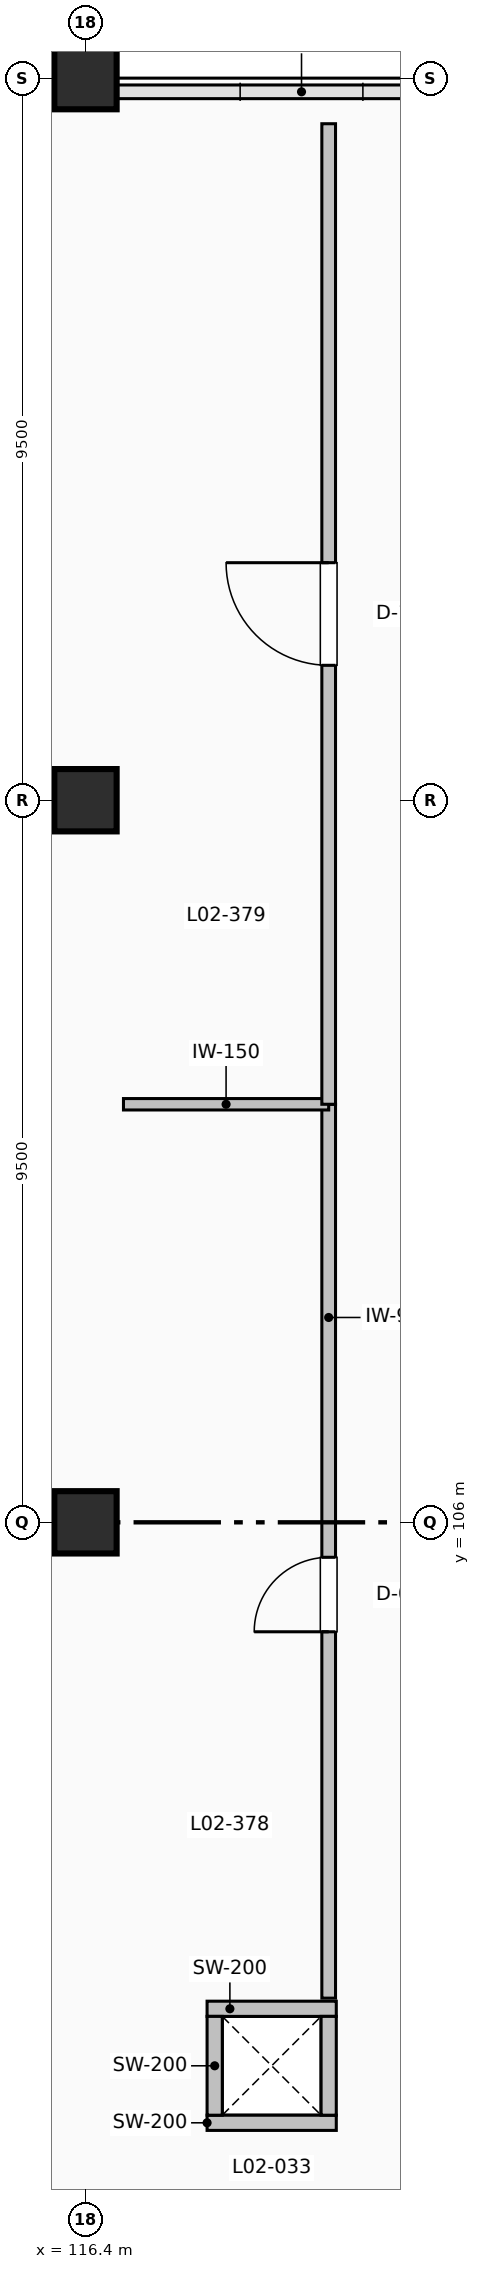
"""IFC4 building model, lengths in metres.
Left out: names, types, materials, properties, quantities, classifications, styles, units other than length and angle.
Written with IfcOpenShell. Run it as: python <this file> out.ifc"""

import sys

from ifc_helpers import new_model, si_unit, direction, frame, frame_2d, origin, origin_2d, place, context, subcontext, project, spatial, rectangle, extrude, element, fill, save


model = new_model("IFC4")
c1 = context("Model", 3, precision=1e-05, world=origin(), true_north=direction((0.0, 1.0)))
c2 = subcontext(c1, "Body", "Model", "MODEL_VIEW")
j1 = project(units=[si_unit("LENGTHUNIT", "METRE"), si_unit("PLANEANGLEUNIT", "RADIAN")], contexts=[c1])
p1 = place(None, origin())
s1 = spatial("IfcSite", under=j1, at=p1, CompositionType="ELEMENT")
p2 = place(p1, origin())
s2 = spatial("IfcBuilding", under=s1, at=p2, CompositionType="ELEMENT")
p3 = place(p2, frame((0.0, 0.0, 10.2)))
s3 = spatial("IfcBuildingStorey", under=s2, at=p3, CompositionType="ELEMENT", Elevation=10.2)
for number, where, z_axis, x_axis in (
    (1, (116.4, 106.0, 0.0), (0.0, 0.0, 1.0), (1.0, 0.0, 0.0)),
    (2, (116.4, 115.5, 0.0), (0.0, 0.0, 1.0), (1.0, 0.0, 0.0)),
    (3, (116.4, 125.0, 0.0), (0.0, 0.0, 1.0), (1.0, 0.0, 0.0)),
):
    element("IfcColumn", number, at=place(p3, frame(where, z_axis=z_axis, x_axis=x_axis)), inside=s3, PredefinedType="COLUMN", context=c2, shape_type="SweptSolid", body=[
        extrude(rectangle(XDim=0.82, YDim=0.82, at=origin_2d()), origin(), (0.0, 0.0, 1.0), 4.8),
    ])
for number, where, z_axis, x_axis in (
    (4, (118.0, 98.1, 0.0), (0.0, 0.0, 1.0), (1.0, 0.0, 0.0)),
    (5, (119.7, 99.6, 0.0), (0.0, 0.0, 1.0), (-1.0, 0.0, 0.0)),
):
    element("IfcWall", number, at=place(p3, frame(where, z_axis=z_axis, x_axis=x_axis)), inside=s3, PredefinedType="PARTITIONING", context=c2, shape_type="SweptSolid", body=[
        extrude(rectangle(XDim=1.7, YDim=0.2, at=frame_2d((0.85, 0.0))), origin(), (0.0, 0.0, 1.0), 4.5),
    ])
for number, where, z_axis, x_axis in (
    (6, (118.1, 98.2, 0.0), (0.0, 0.0, 1.0), (0.0, 1.0, 0.0)),
    (7, (119.6, 99.5, 0.0), (0.0, 0.0, 1.0), (0.0, -1.0, 0.0)),
):
    element("IfcWall", number, at=place(p3, frame(where, z_axis=z_axis, x_axis=x_axis)), inside=s3, PredefinedType="PARTITIONING", context=c2, shape_type="SweptSolid", body=[
        extrude(rectangle(XDim=1.3, YDim=0.2, at=frame_2d((0.65, 0.0))), origin(), (0.0, 0.0, 1.0), 4.5),
    ])
p4 = place(p3, frame((119.6, 99.74, 0.0), z_axis=(0.0, 0.0, 1.0), x_axis=(0.0, 1.0, 0.0)))
e8 = element("IfcWall", 8, at=p4, inside=s3, PredefinedType="PARTITIONING", context=c2, shape_type="SweptSolid", body=[
    extrude(rectangle(XDim=11.76, YDim=0.18, at=frame_2d((5.88, 0.0))), origin(), (0.0, 0.0, 1.0), 4.492),
])
p5 = place(p4, frame((4.82, 0.0, 0.0)))
e9 = element("IfcOpeningElement", 9, at=p5, cuts=e8, PredefinedType="OPENING", context=c2, shape_type="SweptSolid", body=[
    extrude(rectangle(XDim=0.98, YDim=2.08, at=frame_2d((0.49, 1.04))), frame((0.0, 0.1, 0.0), z_axis=(0.0, -1.0, 0.0), x_axis=(1.0, 0.0, 0.0)), (0.0, 0.0, 1.0), 0.2),
])
p6 = place(p3, frame((116.9, 111.5, 0.0), z_axis=(0.0, 0.0, 1.0), x_axis=(1.0, 0.0, 0.0)))
e10 = element("IfcWall", 10, at=p6, inside=s3, PredefinedType="PARTITIONING", context=c2, shape_type="SweptSolid", body=[
    extrude(rectangle(XDim=2.7, YDim=0.15, at=frame_2d((1.35, 0.0))), origin(), (0.0, 0.0, 1.0), 4.492),
])
p7 = place(p3, frame((119.6, 111.5, 0.0), z_axis=(0.0, 0.0, 1.0), x_axis=(0.0, 1.0, 0.0)))
e11 = element("IfcWall", 11, at=p7, inside=s3, PredefinedType="PARTITIONING", context=c2, shape_type="SweptSolid", body=[
    extrude(rectangle(XDim=12.9, YDim=0.18, at=frame_2d((6.45, 0.0))), origin(), (0.0, 0.0, 1.0), 4.492),
])
p8 = place(p7, frame((5.775, 0.0, 0.0)))
e12 = element("IfcOpeningElement", 12, at=p8, cuts=e11, PredefinedType="OPENING", context=c2, shape_type="SweptSolid", body=[
    extrude(rectangle(XDim=1.35, YDim=2.16, at=frame_2d((0.675, 1.08))), frame((0.0, 0.1, 0.0), z_axis=(0.0, -1.0, 0.0), x_axis=(1.0, 0.0, 0.0)), (0.0, 0.0, 1.0), 0.2),
])
p9 = place(p5, origin())
e13 = element("IfcDoor", 13, at=p9, inside=s3, OperationType="SINGLE_SWING_LEFT", PredefinedType="DOOR", context=c2, shape_type="SweptSolid", body=[
    extrude(rectangle(XDim=0.98, YDim=2.08, at=frame_2d((0.49, 1.04))), frame((0.0, 0.025, 0.0), z_axis=(0.0, -1.0, 0.0), x_axis=(1.0, 0.0, 0.0)), (0.0, 0.0, 1.0), 0.05),
])
fill(e9, e13)
p10 = place(p8, origin())
e14 = element("IfcDoor", 14, at=p10, inside=s3, OperationType="SINGLE_SWING_RIGHT", PredefinedType="DOOR", context=c2, shape_type="SweptSolid", body=[
    extrude(rectangle(XDim=1.35, YDim=2.16, at=frame_2d((0.675, 1.08))), frame((0.0, 0.025, 0.0), z_axis=(0.0, -1.0, 0.0), x_axis=(1.0, 0.0, 0.0)), (0.0, 0.0, 1.0), 0.05),
])
fill(e12, e14)
save(model, sys.argv[1])
